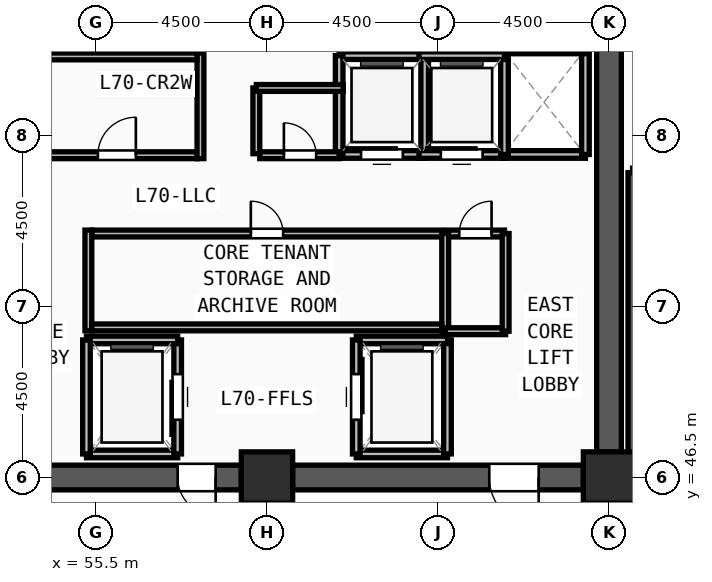
"""IFC4 building model, lengths in metres.
Left out: names, types, materials, properties, quantities, classifications, styles, units other than length and angle.
Written with IfcOpenShell. Run it as: python <this file> out.ifc"""

import sys

from ifc_helpers import new_model, si_unit, direction, frame, frame_2d, origin, origin_2d, place, context, subcontext, project, spatial, rectangle, extrude, source, transform, mapped, element, fill, save


model = new_model("IFC4")
c1 = context("Model", 3, precision=1e-05, world=origin(), true_north=direction((0.0, 1.0)))
c2 = subcontext(c1, "Body", "Model", "MODEL_VIEW")
j1 = project(units=[si_unit("LENGTHUNIT", "METRE"), si_unit("PLANEANGLEUNIT", "RADIAN")], contexts=[c1])
p1 = place(None, origin())
s1 = spatial("IfcSite", under=j1, at=p1, CompositionType="ELEMENT")
p2 = place(p1, origin())
s2 = spatial("IfcBuilding", under=s1, at=p2, CompositionType="ELEMENT")
p3 = place(p2, frame((0.0, 0.0, 270.0)))
s3 = spatial("IfcBuildingStorey", under=s2, at=p3, CompositionType="ELEMENT", Elevation=270.0)
m1 = source(origin(), c2, "Body", "SweptSolid", [
    extrude(rectangle(XDim=1.35, YDim=1.35, at=origin_2d()), origin(), (0.0, 0.0, 1.0), 3.75),
])
for number, where, z_axis, x_axis in (
    (1, (60.0, 46.5, 0.0), (0.0, 0.0, 1.0), (1.0, 0.0, 0.0)),
    (2, (69.0, 46.5, 0.0), (0.0, 0.0, 1.0), (1.0, 0.0, 0.0)),
):
    element("IfcColumn", number, at=place(p3, frame(where, z_axis=z_axis, x_axis=x_axis)), inside=s3, PredefinedType="COLUMN", context=c2, shape_type="MappedRepresentation", body=[
        mapped(m1, transform((0.0, 0.0, 0.0), x_axis=(1.0, 0.0, 0.0), y_axis=(0.0, 1.0, 0.0), z_axis=(0.0, 0.0, 1.0), scale=1.0)),
    ])
p4 = place(p3, frame((69.0, 60.825, 0.0), z_axis=(0.0, 0.0, 1.0), x_axis=(0.0, -1.0, 0.0)))
e3 = element("IfcWall", 3, at=p4, inside=s3, PredefinedType="SHEAR", context=c2, shape_type="SweptSolid", body=[
    extrude(rectangle(XDim=13.65, YDim=0.65, at=frame_2d((6.825, 0.0))), origin(), (0.0, 0.0, 1.0), 3.57),
])
m2 = source(origin(), c2, "Body", "SweptSolid", [
    extrude(rectangle(XDim=1.2, YDim=2.2, at=frame_2d((0.6, 1.1))), frame((0.0, 0.335, 0.0), z_axis=(0.0, -1.0, 0.0), x_axis=(1.0, 0.0, 0.0)), (0.0, 0.0, 1.0), 0.67),
])
p5 = place(p4, frame((1.275, 0.0, 0.0)))
e4 = element("IfcOpeningElement", 4, at=p5, cuts=e3, PredefinedType="OPENING", context=c2, shape_type="MappedRepresentation", body=[
    mapped(m2, transform((0.0, 0.0, 0.0), x_axis=(1.0, 0.0, 0.0), y_axis=(0.0, 1.0, 0.0), z_axis=(0.0, 0.0, 1.0), scale=1.0)),
])
p6 = place(p3, frame((68.325, 46.5, 0.0), z_axis=(0.0, 0.0, 1.0), x_axis=(-1.0, 0.0, 0.0)))
e5 = element("IfcWall", 5, at=p6, inside=s3, PredefinedType="SHEAR", context=c2, shape_type="SweptSolid", body=[
    extrude(rectangle(XDim=7.65, YDim=0.65, at=frame_2d((3.825, 0.0))), origin(), (0.0, 0.0, 1.0), 3.57),
])
m3 = source(origin(), c2, "Body", "SweptSolid", [
    extrude(rectangle(XDim=1.3, YDim=2.2, at=frame_2d((0.65, 1.1))), frame((0.0, 0.335, 0.0), z_axis=(0.0, -1.0, 0.0), x_axis=(1.0, 0.0, 0.0)), (0.0, 0.0, 1.0), 0.67),
])
p7 = place(p6, frame((1.175, 0.0, 0.0)))
e6 = element("IfcOpeningElement", 6, at=p7, cuts=e5, PredefinedType="OPENING", context=c2, shape_type="MappedRepresentation", body=[
    mapped(m3, transform((0.0, 0.0, 0.0), x_axis=(1.0, 0.0, 0.0), y_axis=(0.0, 1.0, 0.0), z_axis=(0.0, 0.0, 1.0), scale=1.0)),
])
p8 = place(p3, frame((59.325, 46.5, 0.0), z_axis=(0.0, 0.0, 1.0), x_axis=(-1.0, 0.0, 0.0)))
e7 = element("IfcWall", 7, at=p8, inside=s3, PredefinedType="SHEAR", context=c2, shape_type="SweptSolid", body=[
    extrude(rectangle(XDim=7.65, YDim=0.65, at=frame_2d((3.825, 0.0))), origin(), (0.0, 0.0, 1.0), 3.57),
])
p9 = place(p8, frame((5.175, 0.0, 0.0)))
e8 = element("IfcOpeningElement", 8, at=p9, cuts=e7, PredefinedType="OPENING", context=c2, shape_type="MappedRepresentation", body=[
    mapped(m3, transform((0.0, 0.0, 0.0), x_axis=(1.0, 0.0, 0.0), y_axis=(0.0, 1.0, 0.0), z_axis=(0.0, 0.0, 1.0), scale=1.0)),
])
m4 = source(origin(), c2, "Body", "SweptSolid", [
    extrude(rectangle(XDim=1.0, YDim=2.2, at=frame_2d((0.5, 1.1))), frame((0.0, 0.335, 0.0), z_axis=(0.0, -1.0, 0.0), x_axis=(1.0, 0.0, 0.0)), (0.0, 0.0, 1.0), 0.67),
])
p10 = place(p8, frame((0.675, 0.0, 0.0)))
e9 = element("IfcOpeningElement", 9, at=p10, cuts=e7, PredefinedType="OPENING", context=c2, shape_type="MappedRepresentation", body=[
    mapped(m4, transform((0.0, 0.0, 0.0), x_axis=(1.0, 0.0, 0.0), y_axis=(0.0, 1.0, 0.0), z_axis=(0.0, 0.0, 1.0), scale=1.0)),
])
p11 = place(p3, frame((69.62, 54.52, 0.0), z_axis=(0.0, 0.0, 1.0), x_axis=(0.0, -1.0, 0.0)))
e10 = element("IfcWall", 10, at=p11, inside=s3, PredefinedType="SOLIDWALL", context=c2, shape_type="SweptSolid", body=[
    extrude(rectangle(XDim=7.82, YDim=0.24, at=frame_2d((3.91, 0.0))), origin(), (0.0, 0.0, 1.0), 3.57),
])
p12 = place(p3, frame((55.25, 47.12, 0.0), z_axis=(0.0, 0.0, 1.0), x_axis=(1.0, 0.0, 0.0)))
e11 = element("IfcWall", 11, at=p12, inside=s3, PredefinedType="SOLIDWALL", context=c2, shape_type="SweptSolid", body=[
    extrude(rectangle(XDim=2.4, YDim=0.2, at=frame_2d((1.2, 0.0))), origin(), (0.0, 0.0, 1.0), 3.57),
])
p13 = place(p3, frame((57.65, 47.12, 0.0), z_axis=(0.0, 0.0, 1.0), x_axis=(0.0, 1.0, 0.0)))
e12 = element("IfcWall", 12, at=p13, inside=s3, PredefinedType="SOLIDWALL", context=c2, shape_type="SweptSolid", body=[
    extrude(rectangle(XDim=3.0, YDim=0.2, at=frame_2d((1.5, 0.0))), origin(), (0.0, 0.0, 1.0), 3.57),
])
m5 = source(origin(), c2, "Body", "SweptSolid", [
    extrude(rectangle(XDim=1.2, YDim=2.3, at=frame_2d((0.6, 1.15))), frame((0.0, 0.11, 0.0), z_axis=(0.0, -1.0, 0.0), x_axis=(1.0, 0.0, 0.0)), (0.0, 0.0, 1.0), 0.22),
])
p14 = place(p13, frame((0.9, 0.0, 0.0)))
e13 = element("IfcOpeningElement", 13, at=p14, cuts=e12, PredefinedType="OPENING", context=c2, shape_type="MappedRepresentation", body=[
    mapped(m5, transform((0.0, 0.0, 0.0), x_axis=(1.0, 0.0, 0.0), y_axis=(0.0, 1.0, 0.0), z_axis=(0.0, 0.0, 1.0), scale=1.0)),
])
p15 = place(p3, frame((57.65, 50.12, 0.0), z_axis=(0.0, 0.0, 1.0), x_axis=(-1.0, 0.0, 0.0)))
e14 = element("IfcWall", 14, at=p15, inside=s3, PredefinedType="SOLIDWALL", context=c2, shape_type="SweptSolid", body=[
    extrude(rectangle(XDim=2.4, YDim=0.2, at=frame_2d((1.2, 0.0))), origin(), (0.0, 0.0, 1.0), 3.57),
])
p16 = place(p3, frame((55.25, 50.12, 0.0), z_axis=(0.0, 0.0, 1.0), x_axis=(0.0, -1.0, 0.0)))
e15 = element("IfcWall", 15, at=p16, inside=s3, PredefinedType="SOLIDWALL", context=c2, shape_type="SweptSolid", body=[
    extrude(rectangle(XDim=3.0, YDim=0.2, at=frame_2d((1.5, 0.0))), origin(), (0.0, 0.0, 1.0), 3.57),
])
p17 = place(p3, frame((62.35, 47.12, 0.0), z_axis=(0.0, 0.0, 1.0), x_axis=(1.0, 0.0, 0.0)))
e16 = element("IfcWall", 16, at=p17, inside=s3, PredefinedType="SOLIDWALL", context=c2, shape_type="SweptSolid", body=[
    extrude(rectangle(XDim=2.4, YDim=0.2, at=frame_2d((1.2, 0.0))), origin(), (0.0, 0.0, 1.0), 3.57),
])
p18 = place(p3, frame((64.75, 47.12, 0.0), z_axis=(0.0, 0.0, 1.0), x_axis=(0.0, 1.0, 0.0)))
e17 = element("IfcWall", 17, at=p18, inside=s3, PredefinedType="SOLIDWALL", context=c2, shape_type="SweptSolid", body=[
    extrude(rectangle(XDim=3.0, YDim=0.2, at=frame_2d((1.5, 0.0))), origin(), (0.0, 0.0, 1.0), 3.57),
])
p19 = place(p3, frame((64.75, 50.12, 0.0), z_axis=(0.0, 0.0, 1.0), x_axis=(-1.0, 0.0, 0.0)))
e18 = element("IfcWall", 18, at=p19, inside=s3, PredefinedType="SOLIDWALL", context=c2, shape_type="SweptSolid", body=[
    extrude(rectangle(XDim=2.4, YDim=0.2, at=frame_2d((1.2, 0.0))), origin(), (0.0, 0.0, 1.0), 3.57),
])
p20 = place(p3, frame((62.35, 50.12, 0.0), z_axis=(0.0, 0.0, 1.0), x_axis=(0.0, -1.0, 0.0)))
e19 = element("IfcWall", 19, at=p20, inside=s3, PredefinedType="SOLIDWALL", context=c2, shape_type="SweptSolid", body=[
    extrude(rectangle(XDim=3.0, YDim=0.2, at=frame_2d((1.5, 0.0))), origin(), (0.0, 0.0, 1.0), 3.57),
])
p21 = place(p20, frame((0.9, 0.0, 0.0)))
e20 = element("IfcOpeningElement", 20, at=p21, cuts=e19, PredefinedType="OPENING", context=c2, shape_type="MappedRepresentation", body=[
    mapped(m5, transform((0.0, 0.0, 0.0), x_axis=(1.0, 0.0, 0.0), y_axis=(0.0, 1.0, 0.0), z_axis=(0.0, 0.0, 1.0), scale=1.0)),
])
p22 = place(p3, frame((66.2, 55.0, 0.0), z_axis=(0.0, 0.0, 1.0), x_axis=(1.0, 0.0, 0.0)))
e21 = element("IfcWall", 21, at=p22, inside=s3, PredefinedType="SOLIDWALL", context=c2, shape_type="SweptSolid", body=[
    extrude(rectangle(XDim=2.18, YDim=0.2, at=frame_2d((1.09, 0.0))), origin(), (0.0, 0.0, 1.0), 3.57),
])
p23 = place(p3, frame((68.38, 55.0, 0.0), z_axis=(0.0, 0.0, 1.0), x_axis=(0.0, 1.0, 0.0)))
e22 = element("IfcWall", 22, at=p23, inside=s3, PredefinedType="SOLIDWALL", context=c2, shape_type="SweptSolid", body=[
    extrude(rectangle(XDim=2.75, YDim=0.2, at=frame_2d((1.375, 0.0))), origin(), (0.0, 0.0, 1.0), 3.57),
])
p24 = place(p3, frame((68.38, 57.75, 0.0), z_axis=(0.0, 0.0, 1.0), x_axis=(-1.0, 0.0, 0.0)))
e23 = element("IfcWall", 23, at=p24, inside=s3, PredefinedType="SOLIDWALL", context=c2, shape_type="SweptSolid", body=[
    extrude(rectangle(XDim=2.18, YDim=0.2, at=frame_2d((1.09, 0.0))), origin(), (0.0, 0.0, 1.0), 3.57),
])
p25 = place(p3, frame((61.9, 55.0, 0.0), z_axis=(0.0, 0.0, 1.0), x_axis=(1.0, 0.0, 0.0)))
e24 = element("IfcWall", 24, at=p25, inside=s3, PredefinedType="SOLIDWALL", context=c2, shape_type="SweptSolid", body=[
    extrude(rectangle(XDim=2.25, YDim=0.2, at=frame_2d((1.125, 0.0))), origin(), (0.0, 0.0, 1.0), 3.57),
])
m6 = source(origin(), c2, "Body", "SweptSolid", [
    extrude(rectangle(XDim=1.1, YDim=2.2, at=frame_2d((0.55, 1.1))), frame((0.0, 0.11, 0.0), z_axis=(0.0, -1.0, 0.0), x_axis=(1.0, 0.0, 0.0)), (0.0, 0.0, 1.0), 0.22),
])
p26 = place(p25, frame((0.575, 0.0, 0.0)))
e25 = element("IfcOpeningElement", 25, at=p26, cuts=e24, PredefinedType="OPENING", context=c2, shape_type="MappedRepresentation", body=[
    mapped(m6, transform((0.0, 0.0, 0.0), x_axis=(1.0, 0.0, 0.0), y_axis=(0.0, 1.0, 0.0), z_axis=(0.0, 0.0, 1.0), scale=1.0)),
])
p27 = place(p3, frame((64.15, 55.0, 0.0), z_axis=(0.0, 0.0, 1.0), x_axis=(0.0, 1.0, 0.0)))
e26 = element("IfcWall", 26, at=p27, inside=s3, PredefinedType="SOLIDWALL", context=c2, shape_type="SweptSolid", body=[
    extrude(rectangle(XDim=2.6, YDim=0.2, at=frame_2d((1.3, 0.0))), origin(), (0.0, 0.0, 1.0), 3.57),
])
p28 = place(p3, frame((64.15, 57.6, 0.0), z_axis=(0.0, 0.0, 1.0), x_axis=(-1.0, 0.0, 0.0)))
e27 = element("IfcWall", 27, at=p28, inside=s3, PredefinedType="SOLIDWALL", context=c2, shape_type="SweptSolid", body=[
    extrude(rectangle(XDim=2.25, YDim=0.2, at=frame_2d((1.125, 0.0))), origin(), (0.0, 0.0, 1.0), 3.57),
])
p29 = place(p3, frame((61.9, 57.6, 0.0), z_axis=(0.0, 0.0, 1.0), x_axis=(0.0, -1.0, 0.0)))
e28 = element("IfcWall", 28, at=p29, inside=s3, PredefinedType="SOLIDWALL", context=c2, shape_type="SweptSolid", body=[
    extrude(rectangle(XDim=2.6, YDim=0.2, at=frame_2d((1.3, 0.0))), origin(), (0.0, 0.0, 1.0), 3.57),
])
p30 = place(p3, frame((64.0, 55.0, 0.0), z_axis=(0.0, 0.0, 1.0), x_axis=(1.0, 0.0, 0.0)))
e29 = element("IfcWall", 29, at=p30, inside=s3, PredefinedType="SOLIDWALL", context=c2, shape_type="SweptSolid", body=[
    extrude(rectangle(XDim=2.25, YDim=0.2, at=frame_2d((1.125, 0.0))), origin(), (0.0, 0.0, 1.0), 3.57),
])
p31 = place(p30, frame((0.575, 0.0, 0.0)))
e30 = element("IfcOpeningElement", 30, at=p31, cuts=e29, PredefinedType="OPENING", context=c2, shape_type="MappedRepresentation", body=[
    mapped(m6, transform((0.0, 0.0, 0.0), x_axis=(1.0, 0.0, 0.0), y_axis=(0.0, 1.0, 0.0), z_axis=(0.0, 0.0, 1.0), scale=1.0)),
])
p32 = place(p3, frame((66.25, 55.0, 0.0), z_axis=(0.0, 0.0, 1.0), x_axis=(0.0, 1.0, 0.0)))
e31 = element("IfcWall", 31, at=p32, inside=s3, PredefinedType="SOLIDWALL", context=c2, shape_type="SweptSolid", body=[
    extrude(rectangle(XDim=2.6, YDim=0.2, at=frame_2d((1.3, 0.0))), origin(), (0.0, 0.0, 1.0), 3.57),
])
p33 = place(p3, frame((66.25, 57.6, 0.0), z_axis=(0.0, 0.0, 1.0), x_axis=(-1.0, 0.0, 0.0)))
e32 = element("IfcWall", 32, at=p33, inside=s3, PredefinedType="SOLIDWALL", context=c2, shape_type="SweptSolid", body=[
    extrude(rectangle(XDim=2.25, YDim=0.2, at=frame_2d((1.125, 0.0))), origin(), (0.0, 0.0, 1.0), 3.57),
])
p34 = place(p3, frame((55.39, 52.92, 0.0), z_axis=(0.0, 0.0, 1.0), x_axis=(1.0, 0.0, 0.0)))
e33 = element("IfcWall", 33, at=p34, inside=s3, PredefinedType="PARTITIONING", context=c2, shape_type="SweptSolid", body=[
    extrude(rectangle(XDim=9.21, YDim=0.18, at=frame_2d((4.605, 0.0))), origin(), (0.0, 0.0, 1.0), 3.57),
])
m7 = source(origin(), c2, "Body", "SweptSolid", [
    extrude(rectangle(XDim=0.85, YDim=2.1, at=frame_2d((0.425, 1.05))), frame((0.0, 0.1, 0.0), z_axis=(0.0, -1.0, 0.0), x_axis=(1.0, 0.0, 0.0)), (0.0, 0.0, 1.0), 0.2),
])
p35 = place(p34, frame((4.185, 0.0, 0.0)))
e34 = element("IfcOpeningElement", 34, at=p35, cuts=e33, PredefinedType="OPENING", context=c2, shape_type="MappedRepresentation", body=[
    mapped(m7, transform((0.0, 0.0, 0.0), x_axis=(1.0, 0.0, 0.0), y_axis=(0.0, 1.0, 0.0), z_axis=(0.0, 0.0, 1.0), scale=1.0)),
])
p36 = place(p3, frame((53.95, 54.98, 0.0), z_axis=(0.0, 0.0, 1.0), x_axis=(1.0, 0.0, 0.0)))
e35 = element("IfcWall", 35, at=p36, inside=s3, PredefinedType="PARTITIONING", context=c2, shape_type="SweptSolid", body=[
    extrude(rectangle(XDim=4.21, YDim=0.18, at=frame_2d((2.105, 0.0))), origin(), (0.0, 0.0, 1.0), 3.57),
])
m8 = source(origin(), c2, "Body", "SweptSolid", [
    extrude(rectangle(XDim=1.0, YDim=2.2, at=frame_2d((0.5, 1.1))), frame((0.0, 0.1, 0.0), z_axis=(0.0, -1.0, 0.0), x_axis=(1.0, 0.0, 0.0)), (0.0, 0.0, 1.0), 0.2),
])
p37 = place(p36, frame((1.6, 0.0, 0.0)))
e36 = element("IfcOpeningElement", 36, at=p37, cuts=e35, PredefinedType="OPENING", context=c2, shape_type="MappedRepresentation", body=[
    mapped(m8, transform((0.0, 0.0, 0.0), x_axis=(1.0, 0.0, 0.0), y_axis=(0.0, 1.0, 0.0), z_axis=(0.0, 0.0, 1.0), scale=1.0)),
])
p38 = place(p3, frame((59.81, 54.98, 0.0), z_axis=(0.0, 0.0, 1.0), x_axis=(1.0, 0.0, 0.0)))
e37 = element("IfcWall", 37, at=p38, inside=s3, PredefinedType="PARTITIONING", context=c2, shape_type="SweptSolid", body=[
    extrude(rectangle(XDim=2.09, YDim=0.18, at=frame_2d((1.045, 0.0))), origin(), (0.0, 0.0, 1.0), 3.57),
])
p39 = place(p38, frame((0.635, 0.0, 0.0)))
e38 = element("IfcOpeningElement", 38, at=p39, cuts=e37, PredefinedType="OPENING", context=c2, shape_type="MappedRepresentation", body=[
    mapped(m7, transform((0.0, 0.0, 0.0), x_axis=(1.0, 0.0, 0.0), y_axis=(0.0, 1.0, 0.0), z_axis=(0.0, 0.0, 1.0), scale=1.0)),
])
p40 = place(p3, frame((64.72, 52.92, 0.0), z_axis=(0.0, 0.0, 1.0), x_axis=(1.0, 0.0, 0.0)))
e39 = element("IfcWall", 39, at=p40, inside=s3, PredefinedType="PARTITIONING", context=c2, shape_type="SweptSolid", body=[
    extrude(rectangle(XDim=1.53, YDim=0.18, at=frame_2d((0.765, 0.0))), origin(), (0.0, 0.0, 1.0), 3.57),
])
p41 = place(p40, frame((0.34, 0.0, 0.0)))
e40 = element("IfcOpeningElement", 40, at=p41, cuts=e39, PredefinedType="OPENING", context=c2, shape_type="MappedRepresentation", body=[
    mapped(m7, transform((0.0, 0.0, 0.0), x_axis=(1.0, 0.0, 0.0), y_axis=(0.0, 1.0, 0.0), z_axis=(0.0, 0.0, 1.0), scale=1.0)),
])
p42 = place(p3, frame((59.72, 55.02, 0.0), z_axis=(0.0, 0.0, 1.0), x_axis=(0.0, 1.0, 0.0)))
e41 = element("IfcWall", 41, at=p42, inside=s3, PredefinedType="PARTITIONING", context=c2, shape_type="SweptSolid", body=[
    extrude(rectangle(XDim=1.73, YDim=0.18, at=frame_2d((0.865, 0.0))), origin(), (0.0, 0.0, 1.0), 3.57),
])
p43 = place(p3, frame((59.72, 56.75, 0.0), z_axis=(0.0, 0.0, 1.0), x_axis=(1.0, 0.0, 0.0)))
e42 = element("IfcWall", 42, at=p43, inside=s3, PredefinedType="PARTITIONING", context=c2, shape_type="SweptSolid", body=[
    extrude(rectangle(XDim=2.29, YDim=0.18, at=frame_2d((1.145, 0.0))), origin(), (0.0, 0.0, 1.0), 3.57),
])
p44 = place(p3, frame((64.69, 50.35, 0.0), z_axis=(0.0, 0.0, 1.0), x_axis=(0.0, 1.0, 0.0)))
e43 = element("IfcWall", 43, at=p44, inside=s3, PredefinedType="PARTITIONING", context=c2, shape_type="SweptSolid", body=[
    extrude(rectangle(XDim=2.57, YDim=0.18, at=frame_2d((1.285, 0.0))), origin(), (0.0, 0.0, 1.0), 3.57),
])
p45 = place(p3, frame((64.69, 50.35, 0.0), z_axis=(0.0, 0.0, 1.0), x_axis=(1.0, 0.0, 0.0)))
e44 = element("IfcWall", 44, at=p45, inside=s3, PredefinedType="PARTITIONING", context=c2, shape_type="SweptSolid", body=[
    extrude(rectangle(XDim=1.59, YDim=0.18, at=frame_2d((0.795, 0.0))), origin(), (0.0, 0.0, 1.0), 3.57),
])
p46 = place(p3, frame((66.28, 50.35, 0.0), z_axis=(0.0, 0.0, 1.0), x_axis=(0.0, 1.0, 0.0)))
e45 = element("IfcWall", 45, at=p46, inside=s3, PredefinedType="PARTITIONING", context=c2, shape_type="SweptSolid", body=[
    extrude(rectangle(XDim=2.57, YDim=0.18, at=frame_2d((1.285, 0.0))), origin(), (0.0, 0.0, 1.0), 3.57),
])
p47 = place(p3, frame((55.3, 50.36, 0.0), z_axis=(0.0, 0.0, 1.0), x_axis=(0.0, 1.0, 0.0)))
e46 = element("IfcWall", 46, at=p47, inside=s3, PredefinedType="PARTITIONING", context=c2, shape_type="SweptSolid", body=[
    extrude(rectangle(XDim=2.65, YDim=0.18, at=frame_2d((1.325, 0.0))), origin(), (0.0, 0.0, 1.0), 3.57),
])
p48 = place(p3, frame((55.39, 50.45, 0.0), z_axis=(0.0, 0.0, 1.0), x_axis=(1.0, 0.0, 0.0)))
e47 = element("IfcWall", 47, at=p48, inside=s3, PredefinedType="PARTITIONING", context=c2, shape_type="SweptSolid", body=[
    extrude(rectangle(XDim=9.21, YDim=0.18, at=frame_2d((4.605, 0.0))), origin(), (0.0, 0.0, 1.0), 3.57),
])
p49 = place(p3, frame((58.25, 54.89, 0.0), z_axis=(0.0, 0.0, 1.0), x_axis=(0.0, 1.0, 0.0)))
e48 = element("IfcWall", 48, at=p49, inside=s3, PredefinedType="PARTITIONING", context=c2, shape_type="SweptSolid", body=[
    extrude(rectangle(XDim=2.78, YDim=0.18, at=frame_2d((1.39, 0.0))), origin(), (0.0, 0.0, 1.0), 3.57),
])
p50 = place(p3, frame((53.95, 57.58, 0.0), z_axis=(0.0, 0.0, 1.0), x_axis=(1.0, 0.0, 0.0)))
e49 = element("IfcWall", 49, at=p50, inside=s3, PredefinedType="PARTITIONING", context=c2, shape_type="SweptSolid", body=[
    extrude(rectangle(XDim=4.21, YDim=0.18, at=frame_2d((2.105, 0.0))), origin(), (0.0, 0.0, 1.0), 3.57),
])
m9 = source(origin(), c2, "Body", "SweptSolid", [
    extrude(rectangle(XDim=1.0, YDim=2.2, at=frame_2d((0.5, 1.1))), frame((0.0, 0.025, 0.0), z_axis=(0.0, -1.0, 0.0), x_axis=(1.0, 0.0, 0.0)), (0.0, 0.0, 1.0), 0.05),
])
p51 = place(p10, origin())
e50 = element("IfcDoor", 50, at=p51, inside=s3, OperationType="SINGLE_SWING_LEFT", PredefinedType="DOOR", context=c2, shape_type="MappedRepresentation", body=[
    mapped(m9, transform((0.0, 0.0, 0.0), x_axis=(1.0, 0.0, 0.0), y_axis=(0.0, 1.0, 0.0), z_axis=(0.0, 0.0, 1.0), scale=1.0)),
])
fill(e9, e50)
m10 = source(origin(), c2, "Body", "SweptSolid", [
    extrude(rectangle(XDim=1.3, YDim=2.2, at=frame_2d((0.65, 1.1))), frame((0.0, 0.025, 0.0), z_axis=(0.0, -1.0, 0.0), x_axis=(1.0, 0.0, 0.0)), (0.0, 0.0, 1.0), 0.05),
])
p52 = place(p7, origin())
e51 = element("IfcDoor", 51, at=p52, inside=s3, OperationType="SINGLE_SWING_LEFT", PredefinedType="DOOR", context=c2, shape_type="MappedRepresentation", body=[
    mapped(m10, transform((0.0, 0.0, 0.0), x_axis=(1.0, 0.0, 0.0), y_axis=(0.0, 1.0, 0.0), z_axis=(0.0, 0.0, 1.0), scale=1.0)),
])
fill(e6, e51)
m11 = source(origin(), c2, "Body", "SweptSolid", [
    extrude(rectangle(XDim=1.2, YDim=2.3, at=frame_2d((0.6, 1.15))), frame((0.0, 0.025, 0.0), z_axis=(0.0, -1.0, 0.0), x_axis=(1.0, 0.0, 0.0)), (0.0, 0.0, 1.0), 0.05),
])
p53 = place(p14, origin())
e52 = element("IfcDoor", 52, at=p53, inside=s3, OperationType="SLIDING_TO_LEFT", PredefinedType="DOOR", context=c2, shape_type="MappedRepresentation", body=[
    mapped(m11, transform((0.0, 0.0, 0.0), x_axis=(1.0, 0.0, 0.0), y_axis=(0.0, 1.0, 0.0), z_axis=(0.0, 0.0, 1.0), scale=1.0)),
])
fill(e13, e52)
p54 = place(p21, origin())
e53 = element("IfcDoor", 53, at=p54, inside=s3, OperationType="SLIDING_TO_LEFT", PredefinedType="DOOR", context=c2, shape_type="MappedRepresentation", body=[
    mapped(m11, transform((0.0, 0.0, 0.0), x_axis=(1.0, 0.0, 0.0), y_axis=(0.0, 1.0, 0.0), z_axis=(0.0, 0.0, 1.0), scale=1.0)),
])
fill(e20, e53)
m12 = source(origin(), c2, "Body", "SweptSolid", [
    extrude(rectangle(XDim=1.1, YDim=2.2, at=frame_2d((0.55, 1.1))), frame((0.0, 0.025, 0.0), z_axis=(0.0, -1.0, 0.0), x_axis=(1.0, 0.0, 0.0)), (0.0, 0.0, 1.0), 0.05),
])
p55 = place(p26, origin())
e54 = element("IfcDoor", 54, at=p55, inside=s3, OperationType="SLIDING_TO_LEFT", PredefinedType="DOOR", context=c2, shape_type="MappedRepresentation", body=[
    mapped(m12, transform((0.0, 0.0, 0.0), x_axis=(1.0, 0.0, 0.0), y_axis=(0.0, 1.0, 0.0), z_axis=(0.0, 0.0, 1.0), scale=1.0)),
])
fill(e25, e54)
p56 = place(p31, origin())
e55 = element("IfcDoor", 55, at=p56, inside=s3, OperationType="SLIDING_TO_LEFT", PredefinedType="DOOR", context=c2, shape_type="MappedRepresentation", body=[
    mapped(m12, transform((0.0, 0.0, 0.0), x_axis=(1.0, 0.0, 0.0), y_axis=(0.0, 1.0, 0.0), z_axis=(0.0, 0.0, 1.0), scale=1.0)),
])
fill(e30, e55)
m13 = source(origin(), c2, "Body", "SweptSolid", [
    extrude(rectangle(XDim=0.85, YDim=2.1, at=frame_2d((0.425, 1.05))), frame((0.0, 0.025, 0.0), z_axis=(0.0, -1.0, 0.0), x_axis=(1.0, 0.0, 0.0)), (0.0, 0.0, 1.0), 0.05),
])
p57 = place(p35, origin())
e56 = element("IfcDoor", 56, at=p57, inside=s3, OperationType="SINGLE_SWING_LEFT", PredefinedType="DOOR", context=c2, shape_type="MappedRepresentation", body=[
    mapped(m13, transform((0.0, 0.0, 0.0), x_axis=(1.0, 0.0, 0.0), y_axis=(0.0, 1.0, 0.0), z_axis=(0.0, 0.0, 1.0), scale=1.0)),
])
fill(e34, e56)
p58 = place(p37, origin())
e57 = element("IfcDoor", 57, at=p58, inside=s3, OperationType="SINGLE_SWING_RIGHT", PredefinedType="DOOR", context=c2, shape_type="MappedRepresentation", body=[
    mapped(m9, transform((0.0, 0.0, 0.0), x_axis=(1.0, 0.0, 0.0), y_axis=(0.0, 1.0, 0.0), z_axis=(0.0, 0.0, 1.0), scale=1.0)),
])
fill(e36, e57)
p59 = place(p39, origin())
e58 = element("IfcDoor", 58, at=p59, inside=s3, OperationType="SINGLE_SWING_LEFT", PredefinedType="DOOR", context=c2, shape_type="MappedRepresentation", body=[
    mapped(m13, transform((0.0, 0.0, 0.0), x_axis=(1.0, 0.0, 0.0), y_axis=(0.0, 1.0, 0.0), z_axis=(0.0, 0.0, 1.0), scale=1.0)),
])
fill(e38, e58)
p60 = place(p41, origin())
e59 = element("IfcDoor", 59, at=p60, inside=s3, OperationType="SINGLE_SWING_RIGHT", PredefinedType="DOOR", context=c2, shape_type="MappedRepresentation", body=[
    mapped(m13, transform((0.0, 0.0, 0.0), x_axis=(1.0, 0.0, 0.0), y_axis=(0.0, 1.0, 0.0), z_axis=(0.0, 0.0, 1.0), scale=1.0)),
])
fill(e40, e59)
save(model, sys.argv[1])
